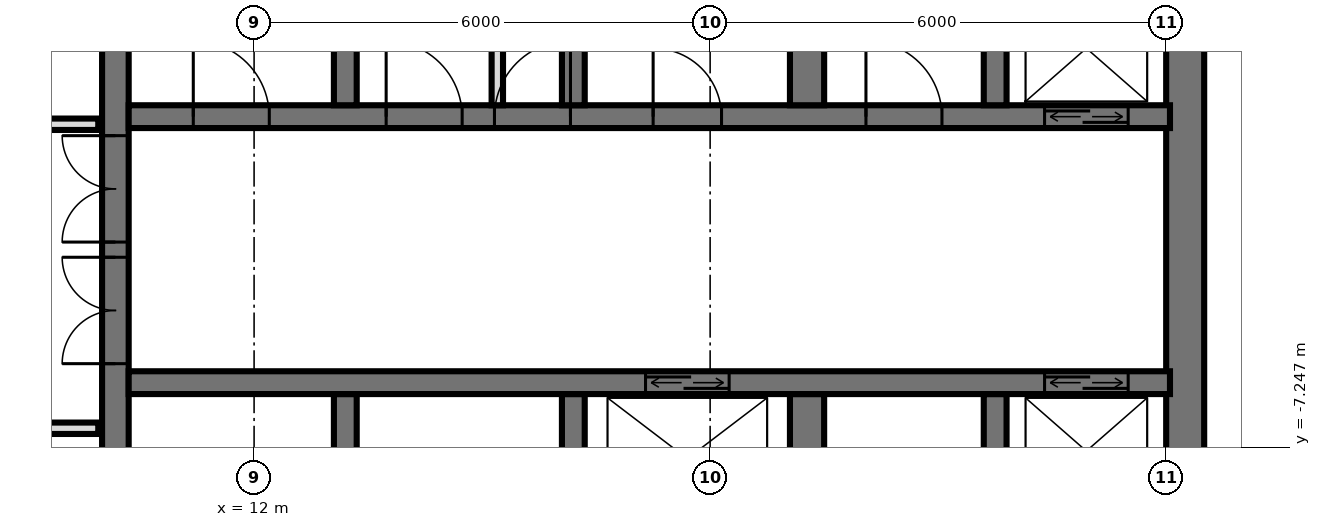
"""IFC4 building model, lengths in metres.
Left out: names, types, materials, properties, quantities, classifications, styles, units other than length and angle.
Written with IfcOpenShell. Run it as: python <this file> out.ifc"""

import sys

from ifc_helpers import new_model, si_unit, direction, frame, frame_2d, origin, place, context, subcontext, project, spatial, rectangle, extrude, element, fill, save


model = new_model("IFC4")
c1 = context("Model", 3, precision=1e-05, world=origin(), true_north=direction((0.0, 1.0)))
c2 = subcontext(c1, "Body", "Model", "MODEL_VIEW")
j1 = project(units=[si_unit("LENGTHUNIT", "METRE"), si_unit("PLANEANGLEUNIT", "RADIAN")], contexts=[c1])
p1 = place(None, origin())
s1 = spatial("IfcSite", under=j1, at=p1, CompositionType="ELEMENT")
p2 = place(p1, origin())
s2 = spatial("IfcBuilding", under=s1, at=p2, CompositionType="ELEMENT")
p3 = place(p2, frame((0.0, 0.0, 174.0)))
s3 = spatial("IfcBuildingStorey", under=s2, at=p3, CompositionType="ELEMENT", Elevation=174.0)
p4 = place(p3, frame((10.175, -14.55, 0.0), z_axis=(0.0, 0.0, 1.0), x_axis=(0.0, 1.0, 0.0)))
e1 = element("IfcWall", 1, at=p4, inside=s3, PredefinedType="SHEAR", context=c2, shape_type="SweptSolid", body=[
    extrude(rectangle(XDim=14.1, YDim=0.35, at=frame_2d((7.05, 0.0))), origin(), (0.0, 0.0, 1.0), 3.6),
])
p5 = place(p4, frame((8.4, 0.0, 0.0)))
e2 = element("IfcOpeningElement", 2, at=p5, cuts=e1, PredefinedType="OPENING", context=c2, shape_type="SweptSolid", body=[
    extrude(rectangle(XDim=1.4, YDim=2.4, at=frame_2d((0.7, 1.2))), frame((0.0, 0.185, 0.0), z_axis=(0.0, -1.0, 0.0), x_axis=(1.0, 0.0, 0.0)), (0.0, 0.0, 1.0), 0.37),
])
p6 = place(p4, frame((10.0, 0.0, 0.0)))
e3 = element("IfcOpeningElement", 3, at=p6, cuts=e1, PredefinedType="OPENING", context=c2, shape_type="SweptSolid", body=[
    extrude(rectangle(XDim=1.4, YDim=2.4, at=frame_2d((0.7, 1.2))), frame((0.0, 0.185, 0.0), z_axis=(0.0, -1.0, 0.0), x_axis=(1.0, 0.0, 0.0)), (0.0, 0.0, 1.0), 0.37),
])
p7 = place(p4, frame((4.0, 0.0, 0.0)))
e4 = element("IfcOpeningElement", 4, at=p7, cuts=e1, PredefinedType="OPENING", context=c2, shape_type="SweptSolid", body=[
    extrude(rectangle(XDim=1.2, YDim=2.1, at=frame_2d((0.6, 1.05))), frame((0.0, 0.185, 0.0), z_axis=(0.0, -1.0, 0.0), x_axis=(1.0, 0.0, 0.0)), (0.0, 0.0, 1.0), 0.37),
])
p8 = place(p3, frame((24.25, -14.55, 0.0), z_axis=(0.0, 0.0, 1.0), x_axis=(0.0, 1.0, 0.0)))
e5 = element("IfcWall", 5, at=p8, inside=s3, PredefinedType="SHEAR", context=c2, shape_type="SweptSolid", body=[
    extrude(rectangle(XDim=14.1, YDim=0.5, at=frame_2d((7.05, 0.0))), origin(), (0.0, 0.0, 1.0), 3.6),
])
p9 = place(p3, frame((10.35, -2.9, 0.0), z_axis=(0.0, 0.0, 1.0), x_axis=(1.0, 0.0, 0.0)))
e6 = element("IfcWall", 6, at=p9, inside=s3, PredefinedType="SHEAR", context=c2, shape_type="SweptSolid", body=[
    extrude(rectangle(XDim=13.7, YDim=0.3, at=frame_2d((6.85, 0.0))), origin(), (0.0, 0.0, 1.0), 3.6),
])
p10 = place(p9, frame((12.05, 0.0, 0.0)))
e7 = element("IfcOpeningElement", 7, at=p10, cuts=e6, PredefinedType="OPENING", context=c2, shape_type="SweptSolid", body=[
    extrude(rectangle(XDim=1.1, YDim=2.1, at=frame_2d((0.55, 1.05))), frame((0.0, 0.16, 0.0), z_axis=(0.0, -1.0, 0.0), x_axis=(1.0, 0.0, 0.0)), (0.0, 0.0, 1.0), 0.32),
])
p11 = place(p9, frame((6.9, 0.0, 0.0)))
e8 = element("IfcOpeningElement", 8, at=p11, cuts=e6, PredefinedType="OPENING", context=c2, shape_type="SweptSolid", body=[
    extrude(rectangle(XDim=0.9, YDim=2.1, at=frame_2d((0.45, 1.05))), frame((0.0, 0.16, 0.0), z_axis=(0.0, -1.0, 0.0), x_axis=(1.0, 0.0, 0.0)), (0.0, 0.0, 1.0), 0.32),
])
p12 = place(p9, frame((0.85, 0.0, 0.0)))
e9 = element("IfcOpeningElement", 9, at=p12, cuts=e6, PredefinedType="OPENING", context=c2, shape_type="SweptSolid", body=[
    extrude(rectangle(XDim=1.0, YDim=2.1, at=frame_2d((0.5, 1.05))), frame((0.0, 0.16, 0.0), z_axis=(0.0, -1.0, 0.0), x_axis=(1.0, 0.0, 0.0)), (0.0, 0.0, 1.0), 0.32),
])
p13 = place(p9, frame((3.387, 0.0, 0.0)))
e10 = element("IfcOpeningElement", 10, at=p13, cuts=e6, PredefinedType="OPENING", context=c2, shape_type="SweptSolid", body=[
    extrude(rectangle(XDim=1.0, YDim=2.1, at=frame_2d((0.5, 1.05))), frame((0.0, 0.16, 0.0), z_axis=(0.0, -1.0, 0.0), x_axis=(1.0, 0.0, 0.0)), (0.0, 0.0, 1.0), 0.32),
])
p14 = place(p9, frame((4.812, 0.0, 0.0)))
e11 = element("IfcOpeningElement", 11, at=p14, cuts=e6, PredefinedType="OPENING", context=c2, shape_type="SweptSolid", body=[
    extrude(rectangle(XDim=1.0, YDim=2.1, at=frame_2d((0.5, 1.05))), frame((0.0, 0.16, 0.0), z_axis=(0.0, -1.0, 0.0), x_axis=(1.0, 0.0, 0.0)), (0.0, 0.0, 1.0), 0.32),
])
p15 = place(p9, frame((9.7, 0.0, 0.0)))
e12 = element("IfcOpeningElement", 12, at=p15, cuts=e6, PredefinedType="OPENING", context=c2, shape_type="SweptSolid", body=[
    extrude(rectangle(XDim=1.0, YDim=2.1, at=frame_2d((0.5, 1.05))), frame((0.0, 0.16, 0.0), z_axis=(0.0, -1.0, 0.0), x_axis=(1.0, 0.0, 0.0)), (0.0, 0.0, 1.0), 0.32),
])
p16 = place(p3, frame((10.35, -6.4, 0.0), z_axis=(0.0, 0.0, 1.0), x_axis=(1.0, 0.0, 0.0)))
e13 = element("IfcWall", 13, at=p16, inside=s3, PredefinedType="SHEAR", context=c2, shape_type="SweptSolid", body=[
    extrude(rectangle(XDim=13.7, YDim=0.3, at=frame_2d((6.85, 0.0))), origin(), (0.0, 0.0, 1.0), 3.6),
])
p17 = place(p16, frame((12.05, 0.0, 0.0)))
e14 = element("IfcOpeningElement", 14, at=p17, cuts=e13, PredefinedType="OPENING", context=c2, shape_type="SweptSolid", body=[
    extrude(rectangle(XDim=1.1, YDim=2.1, at=frame_2d((0.55, 1.05))), frame((0.0, 0.16, 0.0), z_axis=(0.0, -1.0, 0.0), x_axis=(1.0, 0.0, 0.0)), (0.0, 0.0, 1.0), 0.32),
])
p18 = place(p16, frame((6.8, 0.0, 0.0)))
e15 = element("IfcOpeningElement", 15, at=p18, cuts=e13, PredefinedType="OPENING", context=c2, shape_type="SweptSolid", body=[
    extrude(rectangle(XDim=1.1, YDim=2.1, at=frame_2d((0.55, 1.05))), frame((0.0, 0.16, 0.0), z_axis=(0.0, -1.0, 0.0), x_axis=(1.0, 0.0, 0.0)), (0.0, 0.0, 1.0), 0.32),
])
for number, where, z_axis, x_axis in (
    (16, (13.2, -2.75, 0.0), (0.0, 0.0, 1.0), (0.0, 1.0, 0.0)),
    (17, (13.2, -8.85, 0.0), (0.0, 0.0, 1.0), (0.0, 1.0, 0.0)),
    (18, (16.2, -2.75, 0.0), (0.0, 0.0, 1.0), (0.0, 1.0, 0.0)),
    (19, (16.2, -8.85, 0.0), (0.0, 0.0, 1.0), (0.0, 1.0, 0.0)),
):
    element("IfcWall", number, at=place(p3, frame(where, z_axis=z_axis, x_axis=x_axis)), inside=s3, PredefinedType="SHEAR", context=c2, shape_type="SweptSolid", body=[
        extrude(rectangle(XDim=2.3, YDim=0.3, at=frame_2d((1.15, 0.0))), origin(), (0.0, 0.0, 1.0), 3.6),
    ])
for number, where, z_axis, x_axis in (
    (20, (19.275, -2.75, 0.0), (0.0, 0.0, 1.0), (0.0, 1.0, 0.0)),
    (21, (19.275, -8.85, 0.0), (0.0, 0.0, 1.0), (0.0, 1.0, 0.0)),
):
    element("IfcWall", number, at=place(p3, frame(where, z_axis=z_axis, x_axis=x_axis)), inside=s3, PredefinedType="SHEAR", context=c2, shape_type="SweptSolid", body=[
        extrude(rectangle(XDim=2.3, YDim=0.45, at=frame_2d((1.15, 0.0))), origin(), (0.0, 0.0, 1.0), 3.6),
    ])
for number, where, z_axis, x_axis in (
    (22, (21.75, -2.75, 0.0), (0.0, 0.0, 1.0), (0.0, 1.0, 0.0)),
    (23, (21.75, -8.85, 0.0), (0.0, 0.0, 1.0), (0.0, 1.0, 0.0)),
):
    element("IfcWall", number, at=place(p3, frame(where, z_axis=z_axis, x_axis=x_axis)), inside=s3, PredefinedType="SHEAR", context=c2, shape_type="SweptSolid", body=[
        extrude(rectangle(XDim=2.3, YDim=0.3, at=frame_2d((1.15, 0.0))), origin(), (0.0, 0.0, 1.0), 3.6),
    ])
p19 = place(p3, frame((15.2, -2.75, 0.0), z_axis=(0.0, 0.0, 1.0), x_axis=(0.0, 1.0, 0.0)))
e24 = element("IfcWall", 24, at=p19, inside=s3, PredefinedType="PARTITIONING", context=c2, shape_type="SweptSolid", body=[
    extrude(rectangle(XDim=2.3, YDim=0.15, at=frame_2d((1.15, 0.0))), origin(), (0.0, 0.0, 1.0), 3.3),
])
p20 = place(p3, frame((-9.95, -7.0, 0.0), z_axis=(0.0, 0.0, 1.0), x_axis=(1.0, 0.0, 0.0)))
e25 = element("IfcWall", 25, at=p20, inside=s3, PredefinedType="PARTITIONING", context=c2, shape_type="SweptSolid", body=[
    extrude(rectangle(XDim=19.9, YDim=0.15, at=frame_2d((9.95, 0.0))), origin(), (0.0, 0.0, 1.0), 3.32),
])
p21 = place(p20, frame((9.45, 0.0, 0.0)))
e26 = element("IfcOpeningElement", 26, at=p21, cuts=e25, PredefinedType="OPENING", context=c2, shape_type="SweptSolid", body=[
    extrude(rectangle(XDim=1.0, YDim=2.1, at=frame_2d((0.5, 1.05))), frame((0.0, 0.085, 0.0), z_axis=(0.0, -1.0, 0.0), x_axis=(1.0, 0.0, 0.0)), (0.0, 0.0, 1.0), 0.17),
])
p22 = place(p20, frame((15.45, 0.0, 0.0)))
e27 = element("IfcOpeningElement", 27, at=p22, cuts=e25, PredefinedType="OPENING", context=c2, shape_type="SweptSolid", body=[
    extrude(rectangle(XDim=1.0, YDim=2.1, at=frame_2d((0.5, 1.05))), frame((0.0, 0.085, 0.0), z_axis=(0.0, -1.0, 0.0), x_axis=(1.0, 0.0, 0.0)), (0.0, 0.0, 1.0), 0.17),
])
p23 = place(p3, frame((-9.95, -3.0, 0.0), z_axis=(0.0, 0.0, 1.0), x_axis=(1.0, 0.0, 0.0)))
e28 = element("IfcWall", 28, at=p23, inside=s3, PredefinedType="PARTITIONING", context=c2, shape_type="SweptSolid", body=[
    extrude(rectangle(XDim=19.9, YDim=0.15, at=frame_2d((9.95, 0.0))), origin(), (0.0, 0.0, 1.0), 3.32),
])
p24 = place(p23, frame((2.2, 0.0, 0.0)))
e29 = element("IfcOpeningElement", 29, at=p24, cuts=e28, PredefinedType="OPENING", context=c2, shape_type="SweptSolid", body=[
    extrude(rectangle(XDim=1.0, YDim=2.1, at=frame_2d((0.5, 1.05))), frame((0.0, 0.085, 0.0), z_axis=(0.0, -1.0, 0.0), x_axis=(1.0, 0.0, 0.0)), (0.0, 0.0, 1.0), 0.17),
])
p25 = place(p23, frame((7.2, 0.0, 0.0)))
e30 = element("IfcOpeningElement", 30, at=p25, cuts=e28, PredefinedType="OPENING", context=c2, shape_type="SweptSolid", body=[
    extrude(rectangle(XDim=1.0, YDim=2.1, at=frame_2d((0.5, 1.05))), frame((0.0, 0.085, 0.0), z_axis=(0.0, -1.0, 0.0), x_axis=(1.0, 0.0, 0.0)), (0.0, 0.0, 1.0), 0.17),
])
p26 = place(p23, frame((11.7, 0.0, 0.0)))
e31 = element("IfcOpeningElement", 31, at=p26, cuts=e28, PredefinedType="OPENING", context=c2, shape_type="SweptSolid", body=[
    extrude(rectangle(XDim=1.0, YDim=2.1, at=frame_2d((0.5, 1.05))), frame((0.0, 0.085, 0.0), z_axis=(0.0, -1.0, 0.0), x_axis=(1.0, 0.0, 0.0)), (0.0, 0.0, 1.0), 0.17),
])
p27 = place(p23, frame((15.45, 0.0, 0.0)))
e32 = element("IfcOpeningElement", 32, at=p27, cuts=e28, PredefinedType="OPENING", context=c2, shape_type="SweptSolid", body=[
    extrude(rectangle(XDim=1.0, YDim=2.1, at=frame_2d((0.5, 1.05))), frame((0.0, 0.085, 0.0), z_axis=(0.0, -1.0, 0.0), x_axis=(1.0, 0.0, 0.0)), (0.0, 0.0, 1.0), 0.17),
])
p28 = place(p23, frame((18.2, 0.0, 0.0)))
e33 = element("IfcOpeningElement", 33, at=p28, cuts=e28, PredefinedType="OPENING", context=c2, shape_type="SweptSolid", body=[
    extrude(rectangle(XDim=1.0, YDim=2.1, at=frame_2d((0.5, 1.05))), frame((0.0, 0.085, 0.0), z_axis=(0.0, -1.0, 0.0), x_axis=(1.0, 0.0, 0.0)), (0.0, 0.0, 1.0), 0.17),
])
p29 = place(p10, origin())
e34 = element("IfcDoor", 34, at=p29, inside=s3, OperationType="DOUBLE_DOOR_SLIDING", PredefinedType="USERDEFINED", context=c2, shape_type="SweptSolid", body=[
    extrude(rectangle(XDim=1.1, YDim=2.1, at=frame_2d((0.55, 1.05))), frame((0.0, 0.025, 0.0), z_axis=(0.0, -1.0, 0.0), x_axis=(1.0, 0.0, 0.0)), (0.0, 0.0, 1.0), 0.05),
])
fill(e7, e34)
p30 = place(p17, origin())
e35 = element("IfcDoor", 35, at=p30, inside=s3, OperationType="DOUBLE_DOOR_SLIDING", PredefinedType="USERDEFINED", context=c2, shape_type="SweptSolid", body=[
    extrude(rectangle(XDim=1.1, YDim=2.1, at=frame_2d((0.55, 1.05))), frame((0.0, 0.025, 0.0), z_axis=(0.0, -1.0, 0.0), x_axis=(1.0, 0.0, 0.0)), (0.0, 0.0, 1.0), 0.05),
])
fill(e14, e35)
p31 = place(p18, origin())
e36 = element("IfcDoor", 36, at=p31, inside=s3, OperationType="DOUBLE_DOOR_SLIDING", PredefinedType="USERDEFINED", context=c2, shape_type="SweptSolid", body=[
    extrude(rectangle(XDim=1.1, YDim=2.1, at=frame_2d((0.55, 1.05))), frame((0.0, 0.025, 0.0), z_axis=(0.0, -1.0, 0.0), x_axis=(1.0, 0.0, 0.0)), (0.0, 0.0, 1.0), 0.05),
])
fill(e15, e36)
p32 = place(p5, origin())
e37 = element("IfcDoor", 37, at=p32, inside=s3, OperationType="DOUBLE_DOOR_SINGLE_SWING", PredefinedType="DOOR", context=c2, shape_type="SweptSolid", body=[
    extrude(rectangle(XDim=1.4, YDim=2.4, at=frame_2d((0.7, 1.2))), frame((0.0, 0.025, 0.0), z_axis=(0.0, -1.0, 0.0), x_axis=(1.0, 0.0, 0.0)), (0.0, 0.0, 1.0), 0.05),
])
fill(e2, e37)
p33 = place(p6, origin())
e38 = element("IfcDoor", 38, at=p33, inside=s3, OperationType="DOUBLE_DOOR_SINGLE_SWING", PredefinedType="DOOR", context=c2, shape_type="SweptSolid", body=[
    extrude(rectangle(XDim=1.4, YDim=2.4, at=frame_2d((0.7, 1.2))), frame((0.0, 0.025, 0.0), z_axis=(0.0, -1.0, 0.0), x_axis=(1.0, 0.0, 0.0)), (0.0, 0.0, 1.0), 0.05),
])
fill(e3, e38)
p34 = place(p11, origin())
e39 = element("IfcDoor", 39, at=p34, inside=s3, OperationType="SINGLE_SWING_RIGHT", PredefinedType="DOOR", context=c2, shape_type="SweptSolid", body=[
    extrude(rectangle(XDim=0.9, YDim=2.1, at=frame_2d((0.45, 1.05))), frame((0.0, 0.025, 0.0), z_axis=(0.0, -1.0, 0.0), x_axis=(1.0, 0.0, 0.0)), (0.0, 0.0, 1.0), 0.05),
])
fill(e8, e39)
p35 = place(p12, origin())
e40 = element("IfcDoor", 40, at=p35, inside=s3, OperationType="SINGLE_SWING_RIGHT", PredefinedType="DOOR", context=c2, shape_type="SweptSolid", body=[
    extrude(rectangle(XDim=1.0, YDim=2.1, at=frame_2d((0.5, 1.05))), frame((0.0, 0.025, 0.0), z_axis=(0.0, -1.0, 0.0), x_axis=(1.0, 0.0, 0.0)), (0.0, 0.0, 1.0), 0.05),
])
fill(e9, e40)
p36 = place(p13, origin())
e41 = element("IfcDoor", 41, at=p36, inside=s3, OperationType="SINGLE_SWING_RIGHT", PredefinedType="DOOR", context=c2, shape_type="SweptSolid", body=[
    extrude(rectangle(XDim=1.0, YDim=2.1, at=frame_2d((0.5, 1.05))), frame((0.0, 0.025, 0.0), z_axis=(0.0, -1.0, 0.0), x_axis=(1.0, 0.0, 0.0)), (0.0, 0.0, 1.0), 0.05),
])
fill(e10, e41)
p37 = place(p14, origin())
e42 = element("IfcDoor", 42, at=p37, inside=s3, OperationType="SINGLE_SWING_LEFT", PredefinedType="DOOR", context=c2, shape_type="SweptSolid", body=[
    extrude(rectangle(XDim=1.0, YDim=2.1, at=frame_2d((0.5, 1.05))), frame((0.0, 0.025, 0.0), z_axis=(0.0, -1.0, 0.0), x_axis=(1.0, 0.0, 0.0)), (0.0, 0.0, 1.0), 0.05),
])
fill(e11, e42)
p38 = place(p15, origin())
e43 = element("IfcDoor", 43, at=p38, inside=s3, OperationType="SINGLE_SWING_RIGHT", PredefinedType="DOOR", context=c2, shape_type="SweptSolid", body=[
    extrude(rectangle(XDim=1.0, YDim=2.1, at=frame_2d((0.5, 1.05))), frame((0.0, 0.025, 0.0), z_axis=(0.0, -1.0, 0.0), x_axis=(1.0, 0.0, 0.0)), (0.0, 0.0, 1.0), 0.05),
])
fill(e12, e43)
save(model, sys.argv[1])
